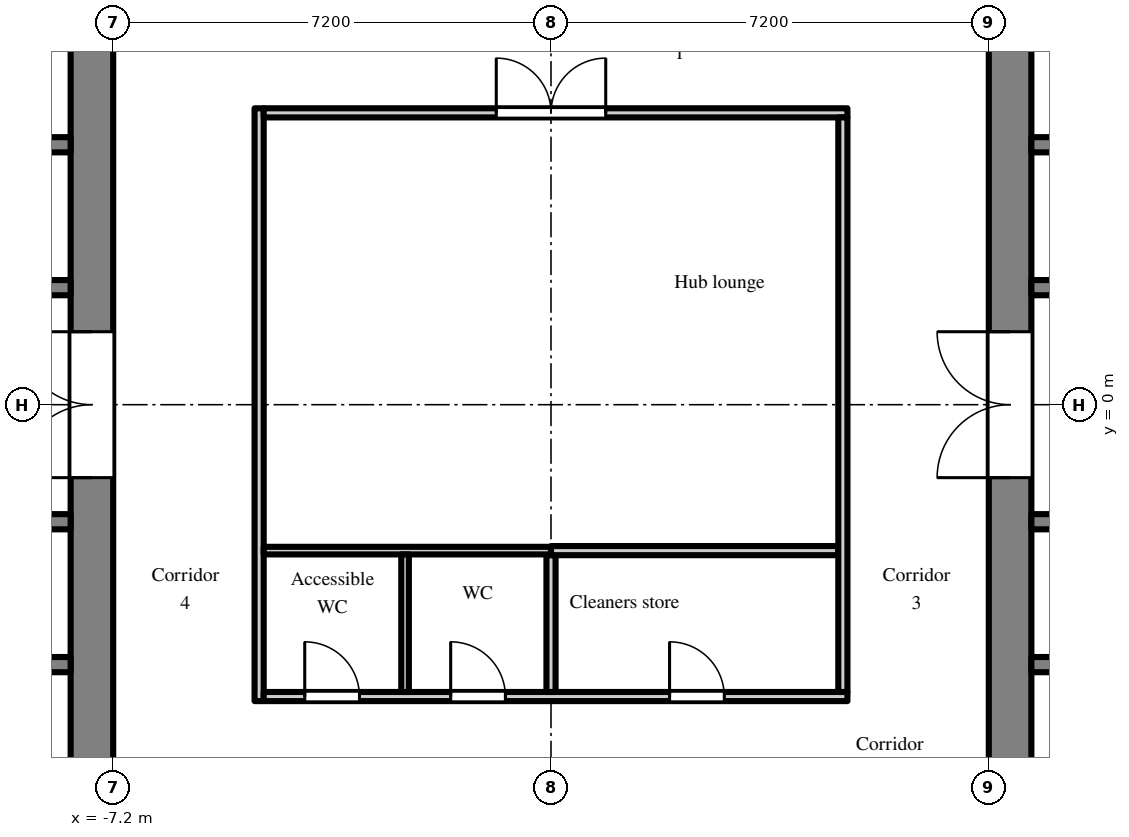
"""IFC4 building model, lengths in metres.
Left out: names, types, materials, properties, quantities, classifications, styles, units other than length and angle.
Written with IfcOpenShell. Run it as: python <this file> out.ifc"""

import sys

from ifc_helpers import new_model, si_unit, direction, frame, frame_2d, origin, place, context, subcontext, project, spatial, rectangle, extrude, element, fill, save


model = new_model("IFC4")
c1 = context("Model", 3, precision=1e-05, world=origin(), true_north=direction((0.0, 1.0)))
c2 = subcontext(c1, "Body", "Model", "MODEL_VIEW")
j1 = project(units=[si_unit("LENGTHUNIT", "METRE"), si_unit("PLANEANGLEUNIT", "RADIAN")], contexts=[c1])
p1 = place(None, origin())
s1 = spatial("IfcSite", under=j1, at=p1, CompositionType="ELEMENT")
p2 = place(p1, origin())
s2 = spatial("IfcBuilding", under=s1, at=p2, CompositionType="ELEMENT")
p3 = place(p2, frame((0.0, 0.0, 120.3)))
s3 = spatial("IfcBuildingStorey", under=s2, at=p3, CompositionType="ELEMENT", Elevation=120.3)
p4 = place(p3, frame((7.55, -7.2, 0.0), z_axis=(0.0, 0.0, 1.0), x_axis=(0.0, 1.0, 0.0)))
e1 = element("IfcWall", 1, at=p4, inside=s3, PredefinedType="SHEAR", context=c2, shape_type="SweptSolid", body=[
    extrude(rectangle(XDim=14.4, YDim=0.7, at=frame_2d((7.2, 0.0))), origin(), (0.0, 0.0, 1.0), 2.6),
])
p5 = place(p4, frame((6.0, 0.0, 0.0)))
e2 = element("IfcOpeningElement", 2, at=p5, cuts=e1, PredefinedType="OPENING", context=c2, shape_type="SweptSolid", body=[
    extrude(rectangle(XDim=2.4, YDim=2.2, at=frame_2d((1.2, 1.1))), frame((0.0, 0.36, 0.0), z_axis=(0.0, -1.0, 0.0), x_axis=(1.0, 0.0, 0.0)), (0.0, 0.0, 1.0), 0.72),
])
p6 = place(p3, frame((7.9, 1.925, 0.0), z_axis=(0.0, 0.0, 1.0), x_axis=(1.0, 0.0, 0.0)))
e3 = element("IfcWall", 3, at=p6, inside=s3, PredefinedType="SHEAR", context=c2, shape_type="SweptSolid", body=[
    extrude(rectangle(XDim=12.95, YDim=0.25, at=frame_2d((6.475, 0.0))), origin(), (0.0, 0.0, 1.0), 2.6),
])
p7 = place(p6, frame((4.825, 0.0, 0.0)))
e4 = element("IfcOpeningElement", 4, at=p7, cuts=e3, PredefinedType="OPENING", context=c2, shape_type="SweptSolid", body=[
    extrude(rectangle(XDim=1.1, YDim=2.1, at=frame_2d((0.55, 1.05))), frame((0.0, 0.135, 0.0), z_axis=(0.0, -1.0, 0.0), x_axis=(1.0, 0.0, 0.0)), (0.0, 0.0, 1.0), 0.27),
])
p8 = place(p6, frame((7.025, 0.0, 0.0)))
e5 = element("IfcOpeningElement", 5, at=p8, cuts=e3, PredefinedType="OPENING", context=c2, shape_type="SweptSolid", body=[
    extrude(rectangle(XDim=1.1, YDim=2.1, at=frame_2d((0.55, 1.05))), frame((0.0, 0.135, 0.0), z_axis=(0.0, -1.0, 0.0), x_axis=(1.0, 0.0, 0.0)), (0.0, 0.0, 1.0), 0.27),
])
p9 = place(p6, frame((9.225, 0.0, 0.0)))
e6 = element("IfcOpeningElement", 6, at=p9, cuts=e3, PredefinedType="OPENING", context=c2, shape_type="SweptSolid", body=[
    extrude(rectangle(XDim=1.1, YDim=2.1, at=frame_2d((0.55, 1.05))), frame((0.0, 0.135, 0.0), z_axis=(0.0, -1.0, 0.0), x_axis=(1.0, 0.0, 0.0)), (0.0, 0.0, 1.0), 0.27),
])
p10 = place(p6, frame((0.525, 0.0, 0.0)))
e7 = element("IfcOpeningElement", 7, at=p10, cuts=e3, PredefinedType="OPENING", context=c2, shape_type="SweptSolid", body=[
    extrude(rectangle(XDim=0.9, YDim=2.1, at=frame_2d((0.45, 1.05))), frame((0.0, 0.135, 0.0), z_axis=(0.0, -1.0, 0.0), x_axis=(1.0, 0.0, 0.0)), (0.0, 0.0, 1.0), 0.27),
])
p11 = place(p6, frame((2.625, 0.0, 0.0)))
e8 = element("IfcOpeningElement", 8, at=p11, cuts=e3, PredefinedType="OPENING", context=c2, shape_type="SweptSolid", body=[
    extrude(rectangle(XDim=1.1, YDim=2.1, at=frame_2d((0.55, 1.05))), frame((0.0, 0.135, 0.0), z_axis=(0.0, -1.0, 0.0), x_axis=(1.0, 0.0, 0.0)), (0.0, 0.0, 1.0), 0.27),
])
p12 = place(p3, frame((7.9, 4.275, 0.0), z_axis=(0.0, 0.0, 1.0), x_axis=(1.0, 0.0, 0.0)))
e9 = element("IfcWall", 9, at=p12, inside=s3, PredefinedType="SHEAR", context=c2, shape_type="SweptSolid", body=[
    extrude(rectangle(XDim=1.95, YDim=0.25, at=frame_2d((0.975, 0.0))), origin(), (0.0, 0.0, 1.0), 2.6),
])
p13 = place(p3, frame((7.9, -1.925, 0.0), z_axis=(0.0, 0.0, 1.0), x_axis=(1.0, 0.0, 0.0)))
e10 = element("IfcWall", 10, at=p13, inside=s3, PredefinedType="SHEAR", context=c2, shape_type="SweptSolid", body=[
    extrude(rectangle(XDim=12.95, YDim=0.25, at=frame_2d((6.475, 0.0))), origin(), (0.0, 0.0, 1.0), 2.6),
])
p14 = place(p13, frame((0.525, 0.0, 0.0)))
e11 = element("IfcOpeningElement", 11, at=p14, cuts=e10, PredefinedType="OPENING", context=c2, shape_type="SweptSolid", body=[
    extrude(rectangle(XDim=0.9, YDim=2.1, at=frame_2d((0.45, 1.05))), frame((0.0, 0.135, 0.0), z_axis=(0.0, -1.0, 0.0), x_axis=(1.0, 0.0, 0.0)), (0.0, 0.0, 1.0), 0.27),
])
p15 = place(p13, frame((2.625, 0.0, 0.0)))
e12 = element("IfcOpeningElement", 12, at=p15, cuts=e10, PredefinedType="OPENING", context=c2, shape_type="SweptSolid", body=[
    extrude(rectangle(XDim=1.1, YDim=2.1, at=frame_2d((0.55, 1.05))), frame((0.0, 0.135, 0.0), z_axis=(0.0, -1.0, 0.0), x_axis=(1.0, 0.0, 0.0)), (0.0, 0.0, 1.0), 0.27),
])
p16 = place(p3, frame((7.9, -4.275, 0.0), z_axis=(0.0, 0.0, 1.0), x_axis=(1.0, 0.0, 0.0)))
e13 = element("IfcWall", 13, at=p16, inside=s3, PredefinedType="SHEAR", context=c2, shape_type="SweptSolid", body=[
    extrude(rectangle(XDim=1.95, YDim=0.25, at=frame_2d((0.975, 0.0))), origin(), (0.0, 0.0, 1.0), 2.6),
])
p17 = place(p3, frame((-7.55, -7.2, 0.0), z_axis=(0.0, 0.0, 1.0), x_axis=(0.0, 1.0, 0.0)))
e14 = element("IfcWall", 14, at=p17, inside=s3, PredefinedType="SHEAR", context=c2, shape_type="SweptSolid", body=[
    extrude(rectangle(XDim=14.4, YDim=0.7, at=frame_2d((7.2, 0.0))), origin(), (0.0, 0.0, 1.0), 2.6),
])
p18 = place(p17, frame((6.0, 0.0, 0.0)))
e15 = element("IfcOpeningElement", 15, at=p18, cuts=e14, PredefinedType="OPENING", context=c2, shape_type="SweptSolid", body=[
    extrude(rectangle(XDim=2.4, YDim=2.2, at=frame_2d((1.2, 1.1))), frame((0.0, 0.36, 0.0), z_axis=(0.0, -1.0, 0.0), x_axis=(1.0, 0.0, 0.0)), (0.0, 0.0, 1.0), 0.72),
])
p19 = place(p3, frame((-7.9, 1.925, 0.0), z_axis=(0.0, 0.0, 1.0), x_axis=(-1.0, 0.0, 0.0)))
e16 = element("IfcWall", 16, at=p19, inside=s3, PredefinedType="SHEAR", context=c2, shape_type="SweptSolid", body=[
    extrude(rectangle(XDim=12.95, YDim=0.25, at=frame_2d((6.475, 0.0))), origin(), (0.0, 0.0, 1.0), 2.6),
])
p20 = place(p19, frame((4.825, 0.0, 0.0)))
e17 = element("IfcOpeningElement", 17, at=p20, cuts=e16, PredefinedType="OPENING", context=c2, shape_type="SweptSolid", body=[
    extrude(rectangle(XDim=1.1, YDim=2.1, at=frame_2d((0.55, 1.05))), frame((0.0, 0.135, 0.0), z_axis=(0.0, -1.0, 0.0), x_axis=(1.0, 0.0, 0.0)), (0.0, 0.0, 1.0), 0.27),
])
p21 = place(p19, frame((7.025, 0.0, 0.0)))
e18 = element("IfcOpeningElement", 18, at=p21, cuts=e16, PredefinedType="OPENING", context=c2, shape_type="SweptSolid", body=[
    extrude(rectangle(XDim=1.1, YDim=2.1, at=frame_2d((0.55, 1.05))), frame((0.0, 0.135, 0.0), z_axis=(0.0, -1.0, 0.0), x_axis=(1.0, 0.0, 0.0)), (0.0, 0.0, 1.0), 0.27),
])
p22 = place(p19, frame((9.225, 0.0, 0.0)))
e19 = element("IfcOpeningElement", 19, at=p22, cuts=e16, PredefinedType="OPENING", context=c2, shape_type="SweptSolid", body=[
    extrude(rectangle(XDim=1.1, YDim=2.1, at=frame_2d((0.55, 1.05))), frame((0.0, 0.135, 0.0), z_axis=(0.0, -1.0, 0.0), x_axis=(1.0, 0.0, 0.0)), (0.0, 0.0, 1.0), 0.27),
])
p23 = place(p19, frame((0.525, 0.0, 0.0)))
e20 = element("IfcOpeningElement", 20, at=p23, cuts=e16, PredefinedType="OPENING", context=c2, shape_type="SweptSolid", body=[
    extrude(rectangle(XDim=0.9, YDim=2.1, at=frame_2d((0.45, 1.05))), frame((0.0, 0.135, 0.0), z_axis=(0.0, -1.0, 0.0), x_axis=(1.0, 0.0, 0.0)), (0.0, 0.0, 1.0), 0.27),
])
p24 = place(p19, frame((2.625, 0.0, 0.0)))
e21 = element("IfcOpeningElement", 21, at=p24, cuts=e16, PredefinedType="OPENING", context=c2, shape_type="SweptSolid", body=[
    extrude(rectangle(XDim=1.1, YDim=2.1, at=frame_2d((0.55, 1.05))), frame((0.0, 0.135, 0.0), z_axis=(0.0, -1.0, 0.0), x_axis=(1.0, 0.0, 0.0)), (0.0, 0.0, 1.0), 0.27),
])
p25 = place(p3, frame((-7.9, 4.275, 0.0), z_axis=(0.0, 0.0, 1.0), x_axis=(-1.0, 0.0, 0.0)))
e22 = element("IfcWall", 22, at=p25, inside=s3, PredefinedType="SHEAR", context=c2, shape_type="SweptSolid", body=[
    extrude(rectangle(XDim=1.95, YDim=0.25, at=frame_2d((0.975, 0.0))), origin(), (0.0, 0.0, 1.0), 2.6),
])
p26 = place(p3, frame((-7.9, -1.925, 0.0), z_axis=(0.0, 0.0, 1.0), x_axis=(-1.0, 0.0, 0.0)))
e23 = element("IfcWall", 23, at=p26, inside=s3, PredefinedType="SHEAR", context=c2, shape_type="SweptSolid", body=[
    extrude(rectangle(XDim=12.95, YDim=0.25, at=frame_2d((6.475, 0.0))), origin(), (0.0, 0.0, 1.0), 2.6),
])
p27 = place(p26, frame((0.525, 0.0, 0.0)))
e24 = element("IfcOpeningElement", 24, at=p27, cuts=e23, PredefinedType="OPENING", context=c2, shape_type="SweptSolid", body=[
    extrude(rectangle(XDim=0.9, YDim=2.1, at=frame_2d((0.45, 1.05))), frame((0.0, 0.135, 0.0), z_axis=(0.0, -1.0, 0.0), x_axis=(1.0, 0.0, 0.0)), (0.0, 0.0, 1.0), 0.27),
])
p28 = place(p26, frame((2.625, 0.0, 0.0)))
e25 = element("IfcOpeningElement", 25, at=p28, cuts=e23, PredefinedType="OPENING", context=c2, shape_type="SweptSolid", body=[
    extrude(rectangle(XDim=1.1, YDim=2.1, at=frame_2d((0.55, 1.05))), frame((0.0, 0.135, 0.0), z_axis=(0.0, -1.0, 0.0), x_axis=(1.0, 0.0, 0.0)), (0.0, 0.0, 1.0), 0.27),
])
p29 = place(p3, frame((-7.9, -4.275, 0.0), z_axis=(0.0, 0.0, 1.0), x_axis=(-1.0, 0.0, 0.0)))
e26 = element("IfcWall", 26, at=p29, inside=s3, PredefinedType="SHEAR", context=c2, shape_type="SweptSolid", body=[
    extrude(rectangle(XDim=1.95, YDim=0.25, at=frame_2d((0.975, 0.0))), origin(), (0.0, 0.0, 1.0), 2.6),
])
p30 = place(p3, frame((-4.8, -4.875, 0.0), z_axis=(0.0, 0.0, 1.0), x_axis=(0.0, 1.0, 0.0)))
e27 = element("IfcWall", 27, at=p30, inside=s3, PredefinedType="PARTITIONING", context=c2, shape_type="SweptSolid", body=[
    extrude(rectangle(XDim=9.75, YDim=0.15, at=frame_2d((4.875, 0.0))), origin(), (0.0, 0.0, 1.0), 2.6),
])
p31 = place(p3, frame((-4.725, -4.8, 0.0), z_axis=(0.0, 0.0, 1.0), x_axis=(1.0, 0.0, 0.0)))
e28 = element("IfcWall", 28, at=p31, inside=s3, PredefinedType="PARTITIONING", context=c2, shape_type="SweptSolid", body=[
    extrude(rectangle(XDim=9.6, YDim=0.15, at=frame_2d((4.8, 0.0))), origin(), (0.0, 0.0, 1.0), 2.6),
])
p32 = place(p31, frame((0.675, 0.0, 0.0)))
e29 = element("IfcOpeningElement", 29, at=p32, cuts=e28, PredefinedType="OPENING", context=c2, shape_type="SweptSolid", body=[
    extrude(rectangle(XDim=0.9, YDim=2.1, at=frame_2d((0.45, 1.05))), frame((0.0, 0.085, 0.0), z_axis=(0.0, -1.0, 0.0), x_axis=(1.0, 0.0, 0.0)), (0.0, 0.0, 1.0), 0.17),
])
p33 = place(p31, frame((3.075, 0.0, 0.0)))
e30 = element("IfcOpeningElement", 30, at=p33, cuts=e28, PredefinedType="OPENING", context=c2, shape_type="SweptSolid", body=[
    extrude(rectangle(XDim=0.9, YDim=2.1, at=frame_2d((0.45, 1.05))), frame((0.0, 0.085, 0.0), z_axis=(0.0, -1.0, 0.0), x_axis=(1.0, 0.0, 0.0)), (0.0, 0.0, 1.0), 0.17),
])
p34 = place(p31, frame((6.675, 0.0, 0.0)))
e31 = element("IfcOpeningElement", 31, at=p34, cuts=e28, PredefinedType="OPENING", context=c2, shape_type="SweptSolid", body=[
    extrude(rectangle(XDim=0.9, YDim=2.1, at=frame_2d((0.45, 1.05))), frame((0.0, 0.085, 0.0), z_axis=(0.0, -1.0, 0.0), x_axis=(1.0, 0.0, 0.0)), (0.0, 0.0, 1.0), 0.17),
])
p35 = place(p3, frame((-4.725, -2.4, 0.0), z_axis=(0.0, 0.0, 1.0), x_axis=(1.0, 0.0, 0.0)))
e32 = element("IfcWall", 32, at=p35, inside=s3, PredefinedType="PARTITIONING", context=c2, shape_type="SweptSolid", body=[
    extrude(rectangle(XDim=4.725, YDim=0.125, at=frame_2d((2.363, 0.0))), origin(), (0.0, 0.0, 1.0), 2.6),
])
p36 = place(p3, frame((-4.725, 4.8, 0.0), z_axis=(0.0, 0.0, 1.0), x_axis=(1.0, 0.0, 0.0)))
e33 = element("IfcWall", 33, at=p36, inside=s3, PredefinedType="PARTITIONING", context=c2, shape_type="SweptSolid", body=[
    extrude(rectangle(XDim=9.6, YDim=0.15, at=frame_2d((4.8, 0.0))), origin(), (0.0, 0.0, 1.0), 2.6),
])
p37 = place(p36, frame((3.825, 0.0, 0.0)))
e34 = element("IfcOpeningElement", 34, at=p37, cuts=e33, PredefinedType="OPENING", context=c2, shape_type="SweptSolid", body=[
    extrude(rectangle(XDim=1.8, YDim=2.1, at=frame_2d((0.9, 1.05))), frame((0.0, 0.085, 0.0), z_axis=(0.0, -1.0, 0.0), x_axis=(1.0, 0.0, 0.0)), (0.0, 0.0, 1.0), 0.17),
])
p38 = place(p3, frame((-2.4, -4.725, 0.0), z_axis=(0.0, 0.0, 1.0), x_axis=(0.0, 1.0, 0.0)))
e35 = element("IfcWall", 35, at=p38, inside=s3, PredefinedType="PARTITIONING", context=c2, shape_type="SweptSolid", body=[
    extrude(rectangle(XDim=2.263, YDim=0.125, at=frame_2d((1.131, 0.0))), origin(), (0.0, 0.0, 1.0), 2.6),
])
p39 = place(p3, frame((0.0, -4.725, 0.0), z_axis=(0.0, 0.0, 1.0), x_axis=(0.0, 1.0, 0.0)))
e36 = element("IfcWall", 36, at=p39, inside=s3, PredefinedType="PARTITIONING", context=c2, shape_type="SweptSolid", body=[
    extrude(rectangle(XDim=2.25, YDim=0.15, at=frame_2d((1.125, 0.0))), origin(), (0.0, 0.0, 1.0), 2.6),
])
p40 = place(p3, frame((0.0, -2.4, 0.0), z_axis=(0.0, 0.0, 1.0), x_axis=(1.0, 0.0, 0.0)))
e37 = element("IfcWall", 37, at=p40, inside=s3, PredefinedType="PARTITIONING", context=c2, shape_type="SweptSolid", body=[
    extrude(rectangle(XDim=4.725, YDim=0.15, at=frame_2d((2.363, 0.0))), origin(), (0.0, 0.0, 1.0), 2.6),
])
p41 = place(p3, frame((4.8, -4.725, 0.0), z_axis=(0.0, 0.0, 1.0), x_axis=(0.0, 1.0, 0.0)))
e38 = element("IfcWall", 38, at=p41, inside=s3, PredefinedType="PARTITIONING", context=c2, shape_type="SweptSolid", body=[
    extrude(rectangle(XDim=9.45, YDim=0.15, at=frame_2d((4.725, 0.0))), origin(), (0.0, 0.0, 1.0), 2.6),
])
p42 = place(p5, origin())
e39 = element("IfcDoor", 39, at=p42, inside=s3, OperationType="DOUBLE_DOOR_DOUBLE_SWING", PredefinedType="DOOR", context=c2, shape_type="SweptSolid", body=[
    extrude(rectangle(XDim=2.4, YDim=2.2, at=frame_2d((1.2, 1.1))), frame((0.0, 0.025, 0.0), z_axis=(0.0, -1.0, 0.0), x_axis=(1.0, 0.0, 0.0)), (0.0, 0.0, 1.0), 0.05),
])
fill(e2, e39)
p43 = place(p18, origin())
e40 = element("IfcDoor", 40, at=p43, inside=s3, OperationType="DOUBLE_DOOR_DOUBLE_SWING", PredefinedType="DOOR", context=c2, shape_type="SweptSolid", body=[
    extrude(rectangle(XDim=2.4, YDim=2.2, at=frame_2d((1.2, 1.1))), frame((0.0, 0.025, 0.0), z_axis=(0.0, -1.0, 0.0), x_axis=(1.0, 0.0, 0.0)), (0.0, 0.0, 1.0), 0.05),
])
fill(e15, e40)
p44 = place(p32, origin())
e41 = element("IfcDoor", 41, at=p44, inside=s3, OperationType="SINGLE_SWING_LEFT", PredefinedType="DOOR", context=c2, shape_type="SweptSolid", body=[
    extrude(rectangle(XDim=0.9, YDim=2.1, at=frame_2d((0.45, 1.05))), frame((0.0, 0.025, 0.0), z_axis=(0.0, -1.0, 0.0), x_axis=(1.0, 0.0, 0.0)), (0.0, 0.0, 1.0), 0.05),
])
fill(e29, e41)
p45 = place(p33, origin())
e42 = element("IfcDoor", 42, at=p45, inside=s3, OperationType="SINGLE_SWING_LEFT", PredefinedType="DOOR", context=c2, shape_type="SweptSolid", body=[
    extrude(rectangle(XDim=0.9, YDim=2.1, at=frame_2d((0.45, 1.05))), frame((0.0, 0.025, 0.0), z_axis=(0.0, -1.0, 0.0), x_axis=(1.0, 0.0, 0.0)), (0.0, 0.0, 1.0), 0.05),
])
fill(e30, e42)
p46 = place(p34, origin())
e43 = element("IfcDoor", 43, at=p46, inside=s3, OperationType="SINGLE_SWING_LEFT", PredefinedType="DOOR", context=c2, shape_type="SweptSolid", body=[
    extrude(rectangle(XDim=0.9, YDim=2.1, at=frame_2d((0.45, 1.05))), frame((0.0, 0.025, 0.0), z_axis=(0.0, -1.0, 0.0), x_axis=(1.0, 0.0, 0.0)), (0.0, 0.0, 1.0), 0.05),
])
fill(e31, e43)
p47 = place(p37, origin())
e44 = element("IfcDoor", 44, at=p47, inside=s3, OperationType="DOUBLE_DOOR_DOUBLE_SWING", PredefinedType="DOOR", context=c2, shape_type="SweptSolid", body=[
    extrude(rectangle(XDim=1.8, YDim=2.1, at=frame_2d((0.9, 1.05))), frame((0.0, 0.025, 0.0), z_axis=(0.0, -1.0, 0.0), x_axis=(1.0, 0.0, 0.0)), (0.0, 0.0, 1.0), 0.05),
])
fill(e34, e44)
save(model, sys.argv[1])
